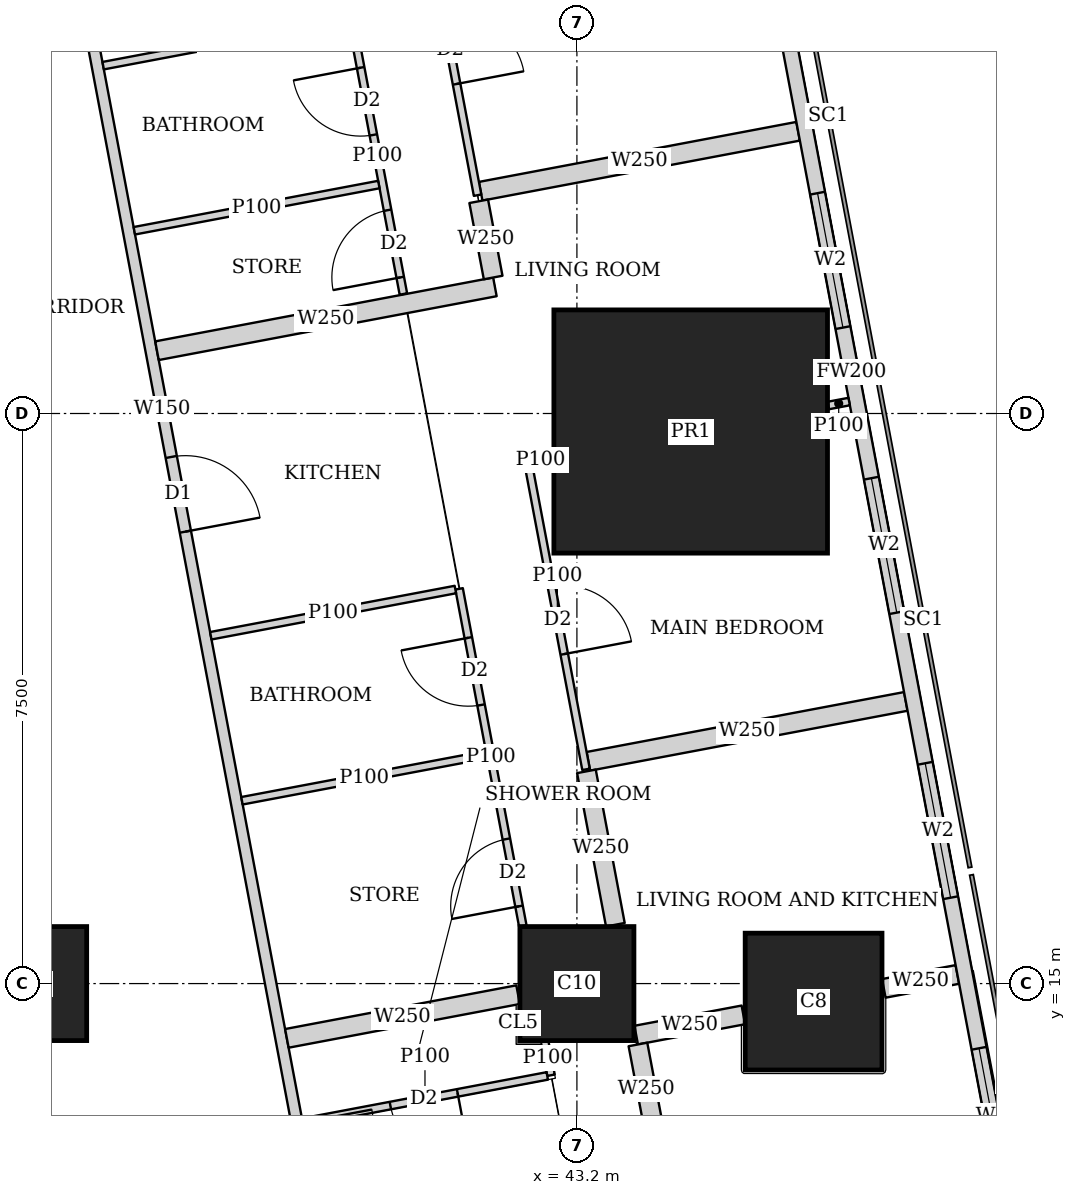
"""IFC4 building model, lengths in metres.
Left out: names, types, materials, properties, quantities, classifications, styles, units other than length and angle.
Written with IfcOpenShell. Run it as: python <this file> out.ifc"""

import sys

from ifc_helpers import new_model, si_unit, direction, frame, frame_2d, origin, origin_2d, place, context, subcontext, project, spatial, rectangle, extrude, element, fill, save


model = new_model("IFC4")
c1 = context("Model", 3, precision=1e-05, world=origin(), true_north=direction((0.0, 1.0)))
c2 = subcontext(c1, "Body", "Model", "MODEL_VIEW")
j1 = project(units=[si_unit("LENGTHUNIT", "METRE"), si_unit("PLANEANGLEUNIT", "RADIAN")], contexts=[c1])
p1 = place(None, origin())
s1 = spatial("IfcSite", under=j1, at=p1, CompositionType="ELEMENT")
p2 = place(p1, origin())
s2 = spatial("IfcBuilding", under=s1, at=p2, CompositionType="ELEMENT")
p3 = place(p2, frame((0.0, 0.0, 169.55)))
s3 = spatial("IfcBuildingStorey", under=s2, at=p3, CompositionType="ELEMENT", Elevation=169.55)
for number, where, z_axis, x_axis in (
    (1, (36.0, 15.0, 0.0), (0.0, 0.0, 1.0), (1.0, 0.0, 0.0)),
    (2, (43.2, 15.0, 0.0), (0.0, 0.0, 1.0), (1.0, 0.0, 0.0)),
):
    element("IfcColumn", number, at=place(p3, frame(where, z_axis=z_axis, x_axis=x_axis)), inside=s3, PredefinedType="COLUMN", context=c2, shape_type="SweptSolid", body=[
        extrude(rectangle(XDim=1.5, YDim=1.5, at=origin_2d()), origin(), (0.0, 0.0, 1.0), 3.75),
    ])
p4 = place(p3, frame((46.314, 14.763, 0.0), z_axis=(0.0, 0.0, 1.0), x_axis=(1.0, 0.0, 0.0)))
e3 = element("IfcColumn", 3, at=p4, inside=s3, PredefinedType="COLUMN", context=c2, shape_type="SweptSolid", body=[
    extrude(rectangle(XDim=1.8, YDim=1.8, at=origin_2d()), origin(), (0.0, 0.0, 1.0), 3.75),
])
p5 = place(p3, frame((44.697, 22.263, 0.0), z_axis=(0.0, 0.0, 1.0), x_axis=(1.0, 0.0, 0.0)))
e4 = element("IfcColumn", 4, at=p5, inside=s3, PredefinedType="COLUMN", context=c2, shape_type="SweptSolid", body=[
    extrude(rectangle(XDim=3.6, YDim=3.2, at=origin_2d()), origin(), (0.0, 0.0, 1.0), 3.75),
])
p6 = place(p3, frame((50.653, 2.703, 0.0), z_axis=(0.0, 0.0, 1.0), x_axis=(-0.185612026696, 0.982623109613, 0.0)))
e5 = element("IfcWall", 5, at=p6, inside=s3, PredefinedType="SOLIDWALL", context=c2, shape_type="SweptSolid", body=[
    extrude(rectangle(XDim=41.393, YDim=0.2, at=frame_2d((20.697, 0.0))), origin(), (0.0, 0.0, 1.0), 3.5),
])
p7 = place(p6, frame((1.633, 0.0, 0.9)))
e6 = element("IfcOpeningElement", 6, at=p7, cuts=e5, PredefinedType="OPENING", context=c2, shape_type="SweptSolid", body=[
    extrude(rectangle(XDim=1.8, YDim=1.5, at=frame_2d((0.9, 0.75))), frame((0.0, 0.11, 0.0), z_axis=(0.0, -1.0, 0.0), x_axis=(1.0, 0.0, 0.0)), (0.0, 0.0, 1.0), 0.22),
])
p8 = place(p6, frame((6.032, 0.0, 0.9)))
e7 = element("IfcOpeningElement", 7, at=p8, cuts=e5, PredefinedType="OPENING", context=c2, shape_type="SweptSolid", body=[
    extrude(rectangle(XDim=1.8, YDim=1.5, at=frame_2d((0.9, 0.75))), frame((0.0, 0.11, 0.0), z_axis=(0.0, -1.0, 0.0), x_axis=(1.0, 0.0, 0.0)), (0.0, 0.0, 1.0), 0.22),
])
p9 = place(p6, frame((9.848, 0.0, 0.9)))
e8 = element("IfcOpeningElement", 8, at=p9, cuts=e5, PredefinedType="OPENING", context=c2, shape_type="SweptSolid", body=[
    extrude(rectangle(XDim=1.8, YDim=1.5, at=frame_2d((0.9, 0.75))), frame((0.0, 0.11, 0.0), z_axis=(0.0, -1.0, 0.0), x_axis=(1.0, 0.0, 0.0)), (0.0, 0.0, 1.0), 0.22),
])
p10 = place(p6, frame((13.664, 0.0, 0.9)))
e9 = element("IfcOpeningElement", 9, at=p10, cuts=e5, PredefinedType="OPENING", context=c2, shape_type="SweptSolid", body=[
    extrude(rectangle(XDim=1.8, YDim=1.5, at=frame_2d((0.9, 0.75))), frame((0.0, 0.11, 0.0), z_axis=(0.0, -1.0, 0.0), x_axis=(1.0, 0.0, 0.0)), (0.0, 0.0, 1.0), 0.22),
])
p11 = place(p6, frame((17.481, 0.0, 0.9)))
e10 = element("IfcOpeningElement", 10, at=p11, cuts=e5, PredefinedType="OPENING", context=c2, shape_type="SweptSolid", body=[
    extrude(rectangle(XDim=1.8, YDim=1.5, at=frame_2d((0.9, 0.75))), frame((0.0, 0.11, 0.0), z_axis=(0.0, -1.0, 0.0), x_axis=(1.0, 0.0, 0.0)), (0.0, 0.0, 1.0), 0.22),
])
p12 = place(p6, frame((21.297, 0.0, 0.9)))
e11 = element("IfcOpeningElement", 11, at=p12, cuts=e5, PredefinedType="OPENING", context=c2, shape_type="SweptSolid", body=[
    extrude(rectangle(XDim=1.8, YDim=1.5, at=frame_2d((0.9, 0.75))), frame((0.0, 0.11, 0.0), z_axis=(0.0, -1.0, 0.0), x_axis=(1.0, 0.0, 0.0)), (0.0, 0.0, 1.0), 0.22),
])
p13 = place(p6, frame((25.113, 0.0, 0.9)))
e12 = element("IfcOpeningElement", 12, at=p13, cuts=e5, PredefinedType="OPENING", context=c2, shape_type="SweptSolid", body=[
    extrude(rectangle(XDim=1.8, YDim=1.5, at=frame_2d((0.9, 0.75))), frame((0.0, 0.11, 0.0), z_axis=(0.0, -1.0, 0.0), x_axis=(1.0, 0.0, 0.0)), (0.0, 0.0, 1.0), 0.22),
])
p14 = place(p6, frame((28.93, 0.0, 0.9)))
e13 = element("IfcOpeningElement", 13, at=p14, cuts=e5, PredefinedType="OPENING", context=c2, shape_type="SweptSolid", body=[
    extrude(rectangle(XDim=1.8, YDim=1.5, at=frame_2d((0.9, 0.75))), frame((0.0, 0.11, 0.0), z_axis=(0.0, -1.0, 0.0), x_axis=(1.0, 0.0, 0.0)), (0.0, 0.0, 1.0), 0.22),
])
p15 = place(p6, frame((32.746, 0.0, 0.9)))
e14 = element("IfcOpeningElement", 14, at=p15, cuts=e5, PredefinedType="OPENING", context=c2, shape_type="SweptSolid", body=[
    extrude(rectangle(XDim=1.8, YDim=1.5, at=frame_2d((0.9, 0.75))), frame((0.0, 0.11, 0.0), z_axis=(0.0, -1.0, 0.0), x_axis=(1.0, 0.0, 0.0)), (0.0, 0.0, 1.0), 0.22),
])
p16 = place(p6, frame((36.481, 0.0, 0.9)))
e15 = element("IfcOpeningElement", 15, at=p16, cuts=e5, PredefinedType="OPENING", context=c2, shape_type="SweptSolid", body=[
    extrude(rectangle(XDim=1.8, YDim=1.5, at=frame_2d((0.9, 0.75))), frame((0.0, 0.11, 0.0), z_axis=(0.0, -1.0, 0.0), x_axis=(1.0, 0.0, 0.0)), (0.0, 0.0, 1.0), 0.22),
])
p17 = place(p3, frame((33.877, 43.029, 0.0), z_axis=(0.0, 0.0, 1.0), x_axis=(0.185596841028, -0.98262597798, 0.0)))
e16 = element("IfcWall", 16, at=p17, inside=s3, PredefinedType="SOLIDWALL", context=c2, shape_type="SweptSolid", body=[
    extrude(rectangle(XDim=41.66, YDim=0.15, at=frame_2d((20.83, 0.0))), origin(), (0.0, 0.0, 1.0), 2.5),
])
p18 = place(p17, frame((8.63, 0.0, 0.0)))
e17 = element("IfcOpeningElement", 17, at=p18, cuts=e16, PredefinedType="OPENING", context=c2, shape_type="SweptSolid", body=[
    extrude(rectangle(XDim=1.0, YDim=2.1, at=frame_2d((0.5, 1.05))), frame((0.0, 0.085, 0.0), z_axis=(0.0, -1.0, 0.0), x_axis=(1.0, 0.0, 0.0)), (0.0, 0.0, 1.0), 0.17),
])
p19 = place(p17, frame((13.841, 0.0, 0.0)))
e18 = element("IfcOpeningElement", 18, at=p19, cuts=e16, PredefinedType="OPENING", context=c2, shape_type="SweptSolid", body=[
    extrude(rectangle(XDim=1.0, YDim=2.1, at=frame_2d((0.5, 1.05))), frame((0.0, 0.085, 0.0), z_axis=(0.0, -1.0, 0.0), x_axis=(1.0, 0.0, 0.0)), (0.0, 0.0, 1.0), 0.17),
])
p20 = place(p17, frame((21.474, 0.0, 0.0)))
e19 = element("IfcOpeningElement", 19, at=p20, cuts=e16, PredefinedType="OPENING", context=c2, shape_type="SweptSolid", body=[
    extrude(rectangle(XDim=1.0, YDim=2.1, at=frame_2d((0.5, 1.05))), frame((0.0, 0.085, 0.0), z_axis=(0.0, -1.0, 0.0), x_axis=(1.0, 0.0, 0.0)), (0.0, 0.0, 1.0), 0.17),
])
p21 = place(p17, frame((30.4, 0.0, 0.0)))
e20 = element("IfcOpeningElement", 20, at=p21, cuts=e16, PredefinedType="OPENING", context=c2, shape_type="SweptSolid", body=[
    extrude(rectangle(XDim=1.0, YDim=2.1, at=frame_2d((0.5, 1.05))), frame((0.0, 0.085, 0.0), z_axis=(0.0, -1.0, 0.0), x_axis=(1.0, 0.0, 0.0)), (0.0, 0.0, 1.0), 0.17),
])
p22 = place(p17, frame((32.288, 0.0, 0.0)))
e21 = element("IfcOpeningElement", 21, at=p22, cuts=e16, PredefinedType="OPENING", context=c2, shape_type="SweptSolid", body=[
    extrude(rectangle(XDim=1.0, YDim=2.1, at=frame_2d((0.5, 1.05))), frame((0.0, 0.085, 0.0), z_axis=(0.0, -1.0, 0.0), x_axis=(1.0, 0.0, 0.0)), (0.0, 0.0, 1.0), 0.17),
])
p23 = place(p3, frame((41.156, 29.273, 0.0), z_axis=(0.0, 0.0, 1.0), x_axis=(0.185662195158, -0.982613631744, 0.0)))
e22 = element("IfcWall", 22, at=p23, inside=s3, PredefinedType="PARTITIONING", context=c2, shape_type="SweptSolid", body=[
    extrude(rectangle(XDim=3.97, YDim=0.1, at=frame_2d((1.985, 0.0))), origin(), (0.0, 0.0, 1.0), 2.5),
])
p24 = place(p23, frame((1.581, 0.0, 0.0)))
e23 = element("IfcOpeningElement", 23, at=p24, cuts=e22, PredefinedType="OPENING", context=c2, shape_type="SweptSolid", body=[
    extrude(rectangle(XDim=0.9, YDim=2.1, at=frame_2d((0.45, 1.05))), frame((0.0, 0.06, 0.0), z_axis=(0.0, -1.0, 0.0), x_axis=(1.0, 0.0, 0.0)), (0.0, 0.0, 1.0), 0.12),
])
p25 = place(p3, frame((40.233, 27.693, 0.0), z_axis=(0.0, 0.0, 1.0), x_axis=(0.185632361754, -0.982619268216, 0.0)))
e24 = element("IfcWall", 24, at=p25, inside=s3, PredefinedType="PARTITIONING", context=c2, shape_type="SweptSolid", body=[
    extrude(rectangle(XDim=3.685, YDim=0.1, at=frame_2d((1.843, 0.0))), origin(), (0.0, 0.0, 1.0), 3.5),
])
p26 = place(p25, frame((0.655, 0.0, 0.0)))
e25 = element("IfcOpeningElement", 25, at=p26, cuts=e24, PredefinedType="OPENING", context=c2, shape_type="SweptSolid", body=[
    extrude(rectangle(XDim=0.9, YDim=2.1, at=frame_2d((0.45, 1.05))), frame((0.0, 0.06, 0.0), z_axis=(0.0, -1.0, 0.0), x_axis=(1.0, 0.0, 0.0)), (0.0, 0.0, 1.0), 0.12),
])
p27 = place(p25, frame((2.563, 0.0, 0.0)))
e26 = element("IfcOpeningElement", 26, at=p27, cuts=e24, PredefinedType="OPENING", context=c2, shape_type="SweptSolid", body=[
    extrude(rectangle(XDim=0.9, YDim=2.1, at=frame_2d((0.45, 1.05))), frame((0.0, 0.06, 0.0), z_axis=(0.0, -1.0, 0.0), x_axis=(1.0, 0.0, 0.0)), (0.0, 0.0, 1.0), 0.12),
])
for number, where, z_axis, x_axis in (
    (27, (40.184, 27.684, 0.0), (0.0, 0.0, 1.0), (-0.983, -0.186, 0.0)),
    (28, (40.594, 25.512, 0.0), (0.0, 0.0, 1.0), (-0.983, -0.186, 0.0)),
):
    element("IfcWall", number, at=place(p3, frame(where, z_axis=z_axis, x_axis=x_axis)), inside=s3, PredefinedType="PARTITIONING", context=c2, shape_type="SweptSolid", body=[
        extrude(rectangle(XDim=3.274, YDim=0.1, at=frame_2d((1.637, 0.0))), origin(), (0.0, 0.0, 1.0), 3.5),
    ])
p28 = place(p3, frame((42.565, 21.809, 0.0), z_axis=(0.0, 0.0, 1.0), x_axis=(0.185910488551, -0.982566684885, 0.0)))
e29 = element("IfcWall", 29, at=p28, inside=s3, PredefinedType="PARTITIONING", context=c2, shape_type="SweptSolid", body=[
    extrude(rectangle(XDim=4.062, YDim=0.1, at=frame_2d((2.031, 0.0))), origin(), (0.0, 0.0, 1.0), 2.5),
])
p29 = place(p28, frame((1.618, 0.0, 0.0)))
e30 = element("IfcOpeningElement", 30, at=p29, cuts=e29, PredefinedType="OPENING", context=c2, shape_type="SweptSolid", body=[
    extrude(rectangle(XDim=0.9, YDim=2.1, at=frame_2d((0.45, 1.05))), frame((0.0, 0.06, 0.0), z_axis=(0.0, -1.0, 0.0), x_axis=(1.0, 0.0, 0.0)), (0.0, 0.0, 1.0), 0.12),
])
p30 = place(p3, frame((41.65, 20.193, 0.0), z_axis=(0.0, 0.0, 1.0), x_axis=(0.185692658583, -0.982607875273, 0.0)))
e31 = element("IfcWall", 31, at=p30, inside=s3, PredefinedType="PARTITIONING", context=c2, shape_type="SweptSolid", body=[
    extrude(rectangle(XDim=4.514, YDim=0.1, at=frame_2d((2.257, 0.0))), origin(), (0.0, 0.0, 1.0), 3.5),
])
p31 = place(p30, frame((0.655, 0.0, 0.0)))
e32 = element("IfcOpeningElement", 32, at=p31, cuts=e31, PredefinedType="OPENING", context=c2, shape_type="SweptSolid", body=[
    extrude(rectangle(XDim=0.9, YDim=2.1, at=frame_2d((0.45, 1.05))), frame((0.0, 0.06, 0.0), z_axis=(0.0, -1.0, 0.0), x_axis=(1.0, 0.0, 0.0)), (0.0, 0.0, 1.0), 0.12),
])
p32 = place(p30, frame((3.35, 0.0, 0.0)))
e33 = element("IfcOpeningElement", 33, at=p32, cuts=e31, PredefinedType="OPENING", context=c2, shape_type="SweptSolid", body=[
    extrude(rectangle(XDim=0.9, YDim=2.1, at=frame_2d((0.45, 1.05))), frame((0.0, 0.06, 0.0), z_axis=(0.0, -1.0, 0.0), x_axis=(1.0, 0.0, 0.0)), (0.0, 0.0, 1.0), 0.12),
])
p33 = place(p3, frame((46.782, 22.657, 0.0), z_axis=(0.0, 0.0, 1.0), x_axis=(-0.982574553168, -0.185868898601, 0.0)))
e34 = element("IfcWall", 34, at=p33, inside=s3, PredefinedType="PARTITIONING", context=c2, shape_type="SweptSolid", body=[
    extrude(rectangle(XDim=0.28, YDim=0.1, at=frame_2d((0.14, 0.0))), origin(), (0.0, 0.0, 1.0), 3.5),
])
p34 = place(p3, frame((42.887, 21.921, 0.0), z_axis=(0.0, 0.0, 1.0), x_axis=(-0.982274918032, -0.187445953293, 0.0)))
e35 = element("IfcWall", 35, at=p34, inside=s3, PredefinedType="PARTITIONING", context=c2, shape_type="SweptSolid", body=[
    extrude(rectangle(XDim=0.336, YDim=0.1, at=frame_2d((0.168, 0.0))), origin(), (0.0, 0.0, 1.0), 2.5),
])
p35 = place(p3, frame((41.601, 20.184, 0.0), z_axis=(0.0, 0.0, 1.0), x_axis=(-0.982607026909, -0.185697147715, 0.0)))
e36 = element("IfcWall", 36, at=p35, inside=s3, PredefinedType="PARTITIONING", context=c2, shape_type="SweptSolid", body=[
    extrude(rectangle(XDim=3.275, YDim=0.1, at=frame_2d((1.637, 0.0))), origin(), (0.0, 0.0, 1.0), 3.5),
])
p36 = place(p3, frame((42.011, 18.012, 0.0), z_axis=(0.0, 0.0, 1.0), x_axis=(-0.982674977865, -0.185337227447, 0.0)))
e37 = element("IfcWall", 37, at=p36, inside=s3, PredefinedType="PARTITIONING", context=c2, shape_type="SweptSolid", body=[
    extrude(rectangle(XDim=3.275, YDim=0.1, at=frame_2d((1.637, 0.0))), origin(), (0.0, 0.0, 1.0), 3.5),
])
p37 = place(p3, frame((46.11, 26.213, 0.0), z_axis=(0.0, 0.0, 1.0), x_axis=(-0.982623519589, -0.185609856287, 0.0)))
e38 = element("IfcWall", 38, at=p37, inside=s3, PredefinedType="SOLIDWALL", context=c2, shape_type="SweptSolid", body=[
    extrude(rectangle(XDim=4.25, YDim=0.25, at=frame_2d((2.125, 0.0))), origin(), (0.0, 0.0, 1.0), 2.1),
])
p38 = place(p3, frame((42.121, 24.166, 0.0), z_axis=(0.0, 0.0, 1.0), x_axis=(-0.982612837616, -0.185666398014, 0.0)))
e39 = element("IfcWall", 39, at=p38, inside=s3, PredefinedType="SOLIDWALL", context=c2, shape_type="SweptSolid", body=[
    extrude(rectangle(XDim=4.525, YDim=0.25, at=frame_2d((2.262, 0.0))), origin(), (0.0, 0.0, 1.0), 3.5),
])
p39 = place(p3, frame((41.908, 25.292, 0.0), z_axis=(0.0, 0.0, 1.0), x_axis=(0.18607888991, -0.982534806879, 0.0)))
e40 = element("IfcWall", 40, at=p39, inside=s3, PredefinedType="SOLIDWALL", context=c2, shape_type="SweptSolid", body=[
    extrude(rectangle(XDim=1.021, YDim=0.25, at=frame_2d((0.51, 0.0))), origin(), (0.0, 0.0, 1.0), 3.5),
])
p40 = place(p3, frame((42.775, 14.24, 0.0), z_axis=(0.0, 0.0, 1.0), x_axis=(0.185035443692, -0.982731847748, 0.0)))
e41 = element("IfcWall", 41, at=p40, inside=s3, PredefinedType="PARTITIONING", context=c2, shape_type="SweptSolid", body=[
    extrude(rectangle(XDim=0.454, YDim=0.1, at=frame_2d((0.227, 0.0))), origin(), (0.0, 0.0, 1.0), 3.5),
])
p41 = place(p3, frame((42.81, 13.785, 0.0), z_axis=(0.0, 0.0, 1.0), x_axis=(-0.982620626894, -0.185625169636, 0.0)))
e42 = element("IfcWall", 42, at=p41, inside=s3, PredefinedType="PARTITIONING", context=c2, shape_type="SweptSolid", body=[
    extrude(rectangle(XDim=3.275, YDim=0.1, at=frame_2d((1.637, 0.0))), origin(), (0.0, 0.0, 1.0), 3.5),
])
p42 = place(p41, frame((1.201, 0.0, 0.0)))
e43 = element("IfcOpeningElement", 43, at=p42, cuts=e42, PredefinedType="OPENING", context=c2, shape_type="SweptSolid", body=[
    extrude(rectangle(XDim=0.9, YDim=2.1, at=frame_2d((0.45, 1.05))), frame((0.0, 0.06, 0.0), z_axis=(0.0, -1.0, 0.0), x_axis=(1.0, 0.0, 0.0)), (0.0, 0.0, 1.0), 0.12),
])
p43 = place(p3, frame((47.527, 18.712, 0.0), z_axis=(0.0, 0.0, 1.0), x_axis=(-0.982665405803, -0.185387972203, 0.0)))
e44 = element("IfcWall", 44, at=p43, inside=s3, PredefinedType="SOLIDWALL", context=c2, shape_type="SweptSolid", body=[
    extrude(rectangle(XDim=4.25, YDim=0.25, at=frame_2d((2.125, 0.0))), origin(), (0.0, 0.0, 1.0), 2.1),
])
p44 = place(p3, frame((42.426, 14.854, 0.0), z_axis=(0.0, 0.0, 1.0), x_axis=(-0.982603320446, -0.185716759201, 0.0)))
e45 = element("IfcWall", 45, at=p44, inside=s3, PredefinedType="SOLIDWALL", context=c2, shape_type="SweptSolid", body=[
    extrude(rectangle(XDim=3.096, YDim=0.25, at=frame_2d((1.548, 0.0))), origin(), (0.0, 0.0, 1.0), 3.5),
])
p45 = place(p3, frame((43.325, 17.792, 0.0), z_axis=(0.0, 0.0, 1.0), x_axis=(0.185565963553, -0.982631809566, 0.0)))
e46 = element("IfcWall", 46, at=p45, inside=s3, PredefinedType="SOLIDWALL", context=c2, shape_type="SweptSolid", body=[
    extrude(rectangle(XDim=2.054, YDim=0.25, at=frame_2d((1.027, 0.0))), origin(), (0.0, 0.0, 1.0), 3.5),
])
p46 = place(p3, frame((48.206, 15.12, 0.0), z_axis=(0.0, 0.0, 1.0), x_axis=(-0.982576361834, -0.185859337043, 0.0)))
e47 = element("IfcWall", 47, at=p46, inside=s3, PredefinedType="SOLIDWALL", context=c2, shape_type="SweptSolid", body=[
    extrude(rectangle(XDim=0.985, YDim=0.25, at=frame_2d((0.493, 0.0))), origin(), (0.0, 0.0, 1.0), 2.1),
])
p47 = place(p3, frame((45.39, 14.588, 0.0), z_axis=(0.0, 0.0, 1.0), x_axis=(-0.982680951688, -0.18530555089, 0.0)))
e48 = element("IfcWall", 48, at=p47, inside=s3, PredefinedType="SOLIDWALL", context=c2, shape_type="SweptSolid", body=[
    extrude(rectangle(XDim=1.435, YDim=0.25, at=frame_2d((0.717, 0.0))), origin(), (0.0, 0.0, 1.0), 2.1),
])
p48 = place(p3, frame((44.003, 14.199, 0.0), z_axis=(0.0, 0.0, 1.0), x_axis=(0.186323326179, -0.982488482437, 0.0)))
e49 = element("IfcWall", 49, at=p48, inside=s3, PredefinedType="SOLIDWALL", context=c2, shape_type="SweptSolid", body=[
    extrude(rectangle(XDim=1.181, YDim=0.25, at=frame_2d((0.59, 0.0))), origin(), (0.0, 0.0, 1.0), 3.5),
])
p49 = place(p9, origin())
e50 = element("IfcWindow", 50, at=p49, inside=s3, PartitioningType="SINGLE_PANEL", PredefinedType="WINDOW", context=c2, shape_type="SweptSolid", body=[
    extrude(rectangle(XDim=1.8, YDim=1.5, at=frame_2d((0.9, 0.75))), frame((0.0, 0.03, 0.0), z_axis=(0.0, -1.0, 0.0), x_axis=(1.0, 0.0, 0.0)), (0.0, 0.0, 1.0), 0.06),
])
fill(e8, e50)
p50 = place(p10, origin())
e51 = element("IfcWindow", 51, at=p50, inside=s3, PartitioningType="SINGLE_PANEL", PredefinedType="WINDOW", context=c2, shape_type="SweptSolid", body=[
    extrude(rectangle(XDim=1.8, YDim=1.5, at=frame_2d((0.9, 0.75))), frame((0.0, 0.03, 0.0), z_axis=(0.0, -1.0, 0.0), x_axis=(1.0, 0.0, 0.0)), (0.0, 0.0, 1.0), 0.06),
])
fill(e9, e51)
p51 = place(p11, origin())
e52 = element("IfcWindow", 52, at=p51, inside=s3, PartitioningType="SINGLE_PANEL", PredefinedType="WINDOW", context=c2, shape_type="SweptSolid", body=[
    extrude(rectangle(XDim=1.8, YDim=1.5, at=frame_2d((0.9, 0.75))), frame((0.0, 0.03, 0.0), z_axis=(0.0, -1.0, 0.0), x_axis=(1.0, 0.0, 0.0)), (0.0, 0.0, 1.0), 0.06),
])
fill(e10, e52)
p52 = place(p12, origin())
e53 = element("IfcWindow", 53, at=p52, inside=s3, PartitioningType="SINGLE_PANEL", PredefinedType="WINDOW", context=c2, shape_type="SweptSolid", body=[
    extrude(rectangle(XDim=1.8, YDim=1.5, at=frame_2d((0.9, 0.75))), frame((0.0, 0.03, 0.0), z_axis=(0.0, -1.0, 0.0), x_axis=(1.0, 0.0, 0.0)), (0.0, 0.0, 1.0), 0.06),
])
fill(e11, e53)
p53 = place(p24, origin())
e54 = element("IfcDoor", 54, at=p53, inside=s3, OperationType="SINGLE_SWING_RIGHT", PredefinedType="DOOR", context=c2, shape_type="SweptSolid", body=[
    extrude(rectangle(XDim=0.9, YDim=2.1, at=frame_2d((0.45, 1.05))), frame((0.0, 0.025, 0.0), z_axis=(0.0, -1.0, 0.0), x_axis=(1.0, 0.0, 0.0)), (0.0, 0.0, 1.0), 0.05),
])
fill(e23, e54)
p54 = place(p26, origin())
e55 = element("IfcDoor", 55, at=p54, inside=s3, OperationType="SINGLE_SWING_RIGHT", PredefinedType="DOOR", context=c2, shape_type="SweptSolid", body=[
    extrude(rectangle(XDim=0.9, YDim=2.1, at=frame_2d((0.45, 1.05))), frame((0.0, 0.025, 0.0), z_axis=(0.0, -1.0, 0.0), x_axis=(1.0, 0.0, 0.0)), (0.0, 0.0, 1.0), 0.05),
])
fill(e25, e55)
p55 = place(p27, origin())
e56 = element("IfcDoor", 56, at=p55, inside=s3, OperationType="SINGLE_SWING_LEFT", PredefinedType="DOOR", context=c2, shape_type="SweptSolid", body=[
    extrude(rectangle(XDim=0.9, YDim=2.1, at=frame_2d((0.45, 1.05))), frame((0.0, 0.025, 0.0), z_axis=(0.0, -1.0, 0.0), x_axis=(1.0, 0.0, 0.0)), (0.0, 0.0, 1.0), 0.05),
])
fill(e26, e56)
p56 = place(p29, origin())
e57 = element("IfcDoor", 57, at=p56, inside=s3, OperationType="SINGLE_SWING_RIGHT", PredefinedType="DOOR", context=c2, shape_type="SweptSolid", body=[
    extrude(rectangle(XDim=0.9, YDim=2.1, at=frame_2d((0.45, 1.05))), frame((0.0, 0.025, 0.0), z_axis=(0.0, -1.0, 0.0), x_axis=(1.0, 0.0, 0.0)), (0.0, 0.0, 1.0), 0.05),
])
fill(e30, e57)
p57 = place(p31, origin())
e58 = element("IfcDoor", 58, at=p57, inside=s3, OperationType="SINGLE_SWING_RIGHT", PredefinedType="DOOR", context=c2, shape_type="SweptSolid", body=[
    extrude(rectangle(XDim=0.9, YDim=2.1, at=frame_2d((0.45, 1.05))), frame((0.0, 0.025, 0.0), z_axis=(0.0, -1.0, 0.0), x_axis=(1.0, 0.0, 0.0)), (0.0, 0.0, 1.0), 0.05),
])
fill(e32, e58)
p58 = place(p32, origin())
e59 = element("IfcDoor", 59, at=p58, inside=s3, OperationType="SINGLE_SWING_LEFT", PredefinedType="DOOR", context=c2, shape_type="SweptSolid", body=[
    extrude(rectangle(XDim=0.9, YDim=2.1, at=frame_2d((0.45, 1.05))), frame((0.0, 0.025, 0.0), z_axis=(0.0, -1.0, 0.0), x_axis=(1.0, 0.0, 0.0)), (0.0, 0.0, 1.0), 0.05),
])
fill(e33, e59)
p59 = place(p20, origin())
e60 = element("IfcDoor", 60, at=p59, inside=s3, OperationType="SINGLE_SWING_RIGHT", PredefinedType="DOOR", context=c2, shape_type="SweptSolid", body=[
    extrude(rectangle(XDim=1.0, YDim=2.1, at=frame_2d((0.5, 1.05))), frame((0.0, 0.025, 0.0), z_axis=(0.0, -1.0, 0.0), x_axis=(1.0, 0.0, 0.0)), (0.0, 0.0, 1.0), 0.05),
])
fill(e19, e60)
p60 = place(p42, origin())
e61 = element("IfcDoor", 61, at=p60, inside=s3, OperationType="SINGLE_SWING_LEFT", PredefinedType="DOOR", context=c2, shape_type="SweptSolid", body=[
    extrude(rectangle(XDim=0.9, YDim=2.1, at=frame_2d((0.45, 1.05))), frame((0.0, 0.025, 0.0), z_axis=(0.0, -1.0, 0.0), x_axis=(1.0, 0.0, 0.0)), (0.0, 0.0, 1.0), 0.05),
])
fill(e43, e61)
save(model, sys.argv[1])
